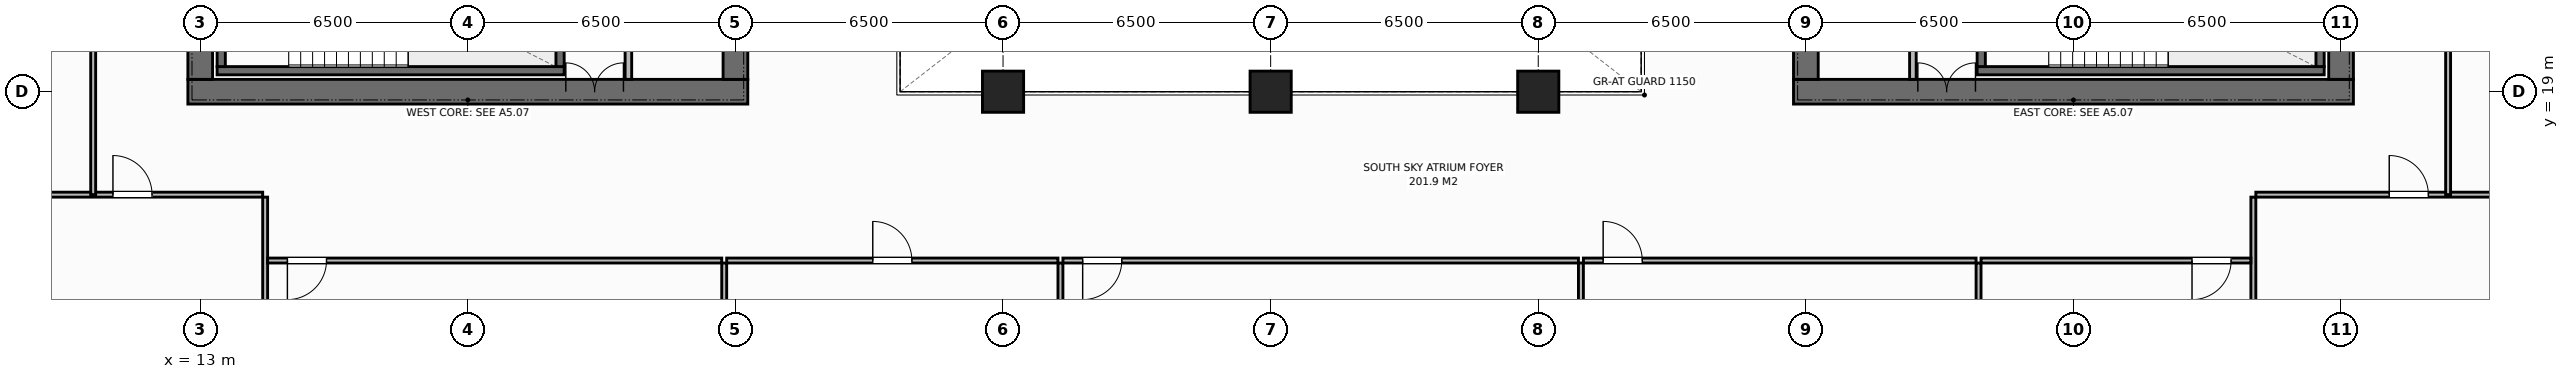
"""IFC4 building model, lengths in metres.
Left out: names, types, materials, properties, quantities, classifications, styles, units other than length and angle.
Written with IfcOpenShell. Run it as: python <this file> out.ifc"""

import sys

from ifc_helpers import new_model, si_unit, direction, frame, frame_2d, origin, origin_2d, place, context, subcontext, project, spatial, rectangle, extrude, element, fill, save


model = new_model("IFC4")
c1 = context("Model", 3, precision=1e-05, world=origin(), true_north=direction((0.0, 1.0)))
c2 = subcontext(c1, "Body", "Model", "MODEL_VIEW")
j1 = project(units=[si_unit("LENGTHUNIT", "METRE"), si_unit("PLANEANGLEUNIT", "RADIAN")], contexts=[c1])
p1 = place(None, origin())
s1 = spatial("IfcSite", under=j1, at=p1, CompositionType="ELEMENT")
p2 = place(p1, origin())
s2 = spatial("IfcBuilding", under=s1, at=p2, CompositionType="ELEMENT")
p3 = place(p2, frame((0.0, 0.0, 189.8)))
s3 = spatial("IfcBuildingStorey", under=s2, at=p3, CompositionType="ELEMENT", Elevation=189.8)
p4 = place(p3, frame((12.7, 19.0, 0.0), z_axis=(0.0, 0.0, 1.0), x_axis=(1.0, 0.0, 0.0)))
e1 = element("IfcWall", 1, at=p4, inside=s3, PredefinedType="SHEAR", context=c2, shape_type="SweptSolid", body=[
    extrude(rectangle(XDim=13.6, YDim=0.6, at=frame_2d((6.8, 0.0))), origin(), (0.0, 0.0, 1.0), 3.8),
])
p5 = place(p4, frame((9.18, 0.0, 0.0)))
e2 = element("IfcOpeningElement", 2, at=p5, cuts=e1, PredefinedType="OPENING", context=c2, shape_type="SweptSolid", body=[
    extrude(rectangle(XDim=1.4, YDim=2.2, at=frame_2d((0.7, 1.1))), frame((0.0, 0.31, 0.0), z_axis=(0.0, -1.0, 0.0), x_axis=(1.0, 0.0, 0.0)), (0.0, 0.0, 1.0), 0.62),
])
p6 = place(p3, frame((13.0, 19.3, 0.0), z_axis=(0.0, 0.0, 1.0), x_axis=(0.0, 1.0, 0.0)))
e3 = element("IfcWall", 3, at=p6, inside=s3, PredefinedType="SHEAR", context=c2, shape_type="SweptSolid", body=[
    extrude(rectangle(XDim=13.4, YDim=0.6, at=frame_2d((6.7, 0.0))), origin(), (0.0, 0.0, 1.0), 3.8),
])
p7 = place(p6, frame((4.75, 0.0, 0.0)))
e4 = element("IfcOpeningElement", 4, at=p7, cuts=e3, PredefinedType="OPENING", context=c2, shape_type="SweptSolid", body=[
    extrude(rectangle(XDim=1.4, YDim=2.2, at=frame_2d((0.7, 1.1))), frame((0.0, 0.31, 0.0), z_axis=(0.0, -1.0, 0.0), x_axis=(1.0, 0.0, 0.0)), (0.0, 0.0, 1.0), 0.62),
])
p8 = place(p3, frame((26.0, 19.3, 0.0), z_axis=(0.0, 0.0, 1.0), x_axis=(0.0, 1.0, 0.0)))
e5 = element("IfcWall", 5, at=p8, inside=s3, PredefinedType="SHEAR", context=c2, shape_type="SweptSolid", body=[
    extrude(rectangle(XDim=13.4, YDim=0.6, at=frame_2d((6.7, 0.0))), origin(), (0.0, 0.0, 1.0), 3.8),
])
p9 = place(p3, frame((51.7, 19.0, 0.0), z_axis=(0.0, 0.0, 1.0), x_axis=(1.0, 0.0, 0.0)))
e6 = element("IfcWall", 6, at=p9, inside=s3, PredefinedType="SHEAR", context=c2, shape_type="SweptSolid", body=[
    extrude(rectangle(XDim=13.6, YDim=0.6, at=frame_2d((6.8, 0.0))), origin(), (0.0, 0.0, 1.0), 3.8),
])
p10 = place(p9, frame((3.02, 0.0, 0.0)))
e7 = element("IfcOpeningElement", 7, at=p10, cuts=e6, PredefinedType="OPENING", context=c2, shape_type="SweptSolid", body=[
    extrude(rectangle(XDim=1.4, YDim=2.2, at=frame_2d((0.7, 1.1))), frame((0.0, 0.31, 0.0), z_axis=(0.0, -1.0, 0.0), x_axis=(1.0, 0.0, 0.0)), (0.0, 0.0, 1.0), 0.62),
])
p11 = place(p3, frame((52.0, 19.3, 0.0), z_axis=(0.0, 0.0, 1.0), x_axis=(0.0, 1.0, 0.0)))
e8 = element("IfcWall", 8, at=p11, inside=s3, PredefinedType="SHEAR", context=c2, shape_type="SweptSolid", body=[
    extrude(rectangle(XDim=13.4, YDim=0.6, at=frame_2d((6.7, 0.0))), origin(), (0.0, 0.0, 1.0), 3.8),
])
p12 = place(p3, frame((65.0, 19.3, 0.0), z_axis=(0.0, 0.0, 1.0), x_axis=(0.0, 1.0, 0.0)))
e9 = element("IfcWall", 9, at=p12, inside=s3, PredefinedType="SHEAR", context=c2, shape_type="SweptSolid", body=[
    extrude(rectangle(XDim=13.4, YDim=0.6, at=frame_2d((6.7, 0.0))), origin(), (0.0, 0.0, 1.0), 3.8),
])
p13 = place(p12, frame((8.15, 0.0, 0.0)))
e10 = element("IfcOpeningElement", 10, at=p13, cuts=e9, PredefinedType="OPENING", context=c2, shape_type="SweptSolid", body=[
    extrude(rectangle(XDim=1.3, YDim=2.2, at=frame_2d((0.65, 1.1))), frame((0.0, 0.31, 0.0), z_axis=(0.0, -1.0, 0.0), x_axis=(1.0, 0.0, 0.0)), (0.0, 0.0, 1.0), 0.62),
])
p14 = place(p3, frame((13.41, 19.51, 0.0), z_axis=(0.0, 0.0, 1.0), x_axis=(1.0, 0.0, 0.0)))
e11 = element("IfcWall", 11, at=p14, inside=s3, PredefinedType="SHEAR", context=c2, shape_type="SweptSolid", body=[
    extrude(rectangle(XDim=8.43, YDim=0.2, at=frame_2d((4.215, 0.0))), origin(), (0.0, 0.0, 1.0), 3.8),
])
for number, where, z_axis, x_axis in (
    (12, (13.51, 19.61, 0.0), (0.0, 0.0, 1.0), (0.0, 1.0, 0.0)),
    (13, (21.74, 19.61, 0.0), (0.0, 0.0, 1.0), (0.0, 1.0, 0.0)),
):
    element("IfcWall", number, at=place(p3, frame(where, z_axis=z_axis, x_axis=x_axis)), inside=s3, PredefinedType="SHEAR", context=c2, shape_type="SweptSolid", body=[
        extrude(rectangle(XDim=3.28, YDim=0.2, at=frame_2d((1.64, 0.0))), origin(), (0.0, 0.0, 1.0), 3.8),
    ])
p15 = place(p3, frame((56.16, 19.51, 0.0), z_axis=(0.0, 0.0, 1.0), x_axis=(1.0, 0.0, 0.0)))
e14 = element("IfcWall", 14, at=p15, inside=s3, PredefinedType="SHEAR", context=c2, shape_type="SweptSolid", body=[
    extrude(rectangle(XDim=8.43, YDim=0.2, at=frame_2d((4.215, 0.0))), origin(), (0.0, 0.0, 1.0), 3.8),
])
for number, where, z_axis, x_axis in (
    (15, (56.26, 19.61, 0.0), (0.0, 0.0, 1.0), (0.0, 1.0, 0.0)),
    (16, (64.49, 19.61, 0.0), (0.0, 0.0, 1.0), (0.0, 1.0, 0.0)),
):
    element("IfcWall", number, at=place(p3, frame(where, z_axis=z_axis, x_axis=x_axis)), inside=s3, PredefinedType="SHEAR", context=c2, shape_type="SweptSolid", body=[
        extrude(rectangle(XDim=3.28, YDim=0.2, at=frame_2d((1.64, 0.0))), origin(), (0.0, 0.0, 1.0), 3.8),
    ])
for number, where, z_axis, x_axis in (
    (17, (32.5, 19.0, 0.0), (0.0, 0.0, 1.0), (1.0, 0.0, 0.0)),
    (18, (39.0, 19.0, 0.0), (0.0, 0.0, 1.0), (1.0, 0.0, 0.0)),
    (19, (45.5, 19.0, 0.0), (0.0, 0.0, 1.0), (1.0, 0.0, 0.0)),
):
    element("IfcColumn", number, at=place(p3, frame(where, z_axis=z_axis, x_axis=x_axis)), inside=s3, PredefinedType="COLUMN", context=c2, shape_type="SweptSolid", body=[
        extrude(rectangle(XDim=1.0, YDim=1.0, at=origin_2d()), origin(), (0.0, 0.0, 1.0), 3.8),
    ])
p16 = place(p3, frame((23.4, 19.3, 0.0), z_axis=(0.0, 0.0, 1.0), x_axis=(0.0, 1.0, 0.0)))
e20 = element("IfcWall", 20, at=p16, inside=s3, PredefinedType="STANDARD", context=c2, shape_type="SweptSolid", body=[
    extrude(rectangle(XDim=13.4, YDim=0.16, at=frame_2d((6.7, 0.0))), origin(), (0.0, 0.0, 1.0), 3.572),
])
p17 = place(p16, frame((2.2, 0.0, 0.0)))
e21 = element("IfcOpeningElement", 21, at=p17, cuts=e20, PredefinedType="OPENING", context=c2, shape_type="SweptSolid", body=[
    extrude(rectangle(XDim=0.95, YDim=2.15, at=frame_2d((0.475, 1.075))), frame((0.0, 0.09, 0.0), z_axis=(0.0, -1.0, 0.0), x_axis=(1.0, 0.0, 0.0)), (0.0, 0.0, 1.0), 0.18),
])
p18 = place(p16, frame((6.3, 0.0, 0.0)))
e22 = element("IfcOpeningElement", 22, at=p18, cuts=e20, PredefinedType="OPENING", context=c2, shape_type="SweptSolid", body=[
    extrude(rectangle(XDim=0.95, YDim=2.15, at=frame_2d((0.475, 1.075))), frame((0.0, 0.09, 0.0), z_axis=(0.0, -1.0, 0.0), x_axis=(1.0, 0.0, 0.0)), (0.0, 0.0, 1.0), 0.18),
])
p19 = place(p16, frame((9.3, 0.0, 0.0)))
e23 = element("IfcOpeningElement", 23, at=p19, cuts=e20, PredefinedType="OPENING", context=c2, shape_type="SweptSolid", body=[
    extrude(rectangle(XDim=1.1, YDim=2.2, at=frame_2d((0.55, 1.1))), frame((0.0, 0.09, 0.0), z_axis=(0.0, -1.0, 0.0), x_axis=(1.0, 0.0, 0.0)), (0.0, 0.0, 1.0), 0.18),
])
p20 = place(p16, frame((11.5, 0.0, 0.0)))
e24 = element("IfcOpeningElement", 24, at=p20, cuts=e20, PredefinedType="OPENING", context=c2, shape_type="SweptSolid", body=[
    extrude(rectangle(XDim=1.1, YDim=2.2, at=frame_2d((0.55, 1.1))), frame((0.0, 0.09, 0.0), z_axis=(0.0, -1.0, 0.0), x_axis=(1.0, 0.0, 0.0)), (0.0, 0.0, 1.0), 0.18),
])
p21 = place(p3, frame((54.6, 19.3, 0.0), z_axis=(0.0, 0.0, 1.0), x_axis=(0.0, 1.0, 0.0)))
e25 = element("IfcWall", 25, at=p21, inside=s3, PredefinedType="STANDARD", context=c2, shape_type="SweptSolid", body=[
    extrude(rectangle(XDim=13.4, YDim=0.16, at=frame_2d((6.7, 0.0))), origin(), (0.0, 0.0, 1.0), 3.572),
])
p22 = place(p21, frame((2.1, 0.0, 0.0)))
e26 = element("IfcOpeningElement", 26, at=p22, cuts=e25, PredefinedType="OPENING", context=c2, shape_type="SweptSolid", body=[
    extrude(rectangle(XDim=0.95, YDim=2.15, at=frame_2d((0.475, 1.075))), frame((0.0, 0.09, 0.0), z_axis=(0.0, -1.0, 0.0), x_axis=(1.0, 0.0, 0.0)), (0.0, 0.0, 1.0), 0.18),
])
p23 = place(p21, frame((6.2, 0.0, 0.0)))
e27 = element("IfcOpeningElement", 27, at=p23, cuts=e25, PredefinedType="OPENING", context=c2, shape_type="SweptSolid", body=[
    extrude(rectangle(XDim=0.95, YDim=2.15, at=frame_2d((0.475, 1.075))), frame((0.0, 0.09, 0.0), z_axis=(0.0, -1.0, 0.0), x_axis=(1.0, 0.0, 0.0)), (0.0, 0.0, 1.0), 0.18),
])
p24 = place(p21, frame((9.3, 0.0, 0.0)))
e28 = element("IfcOpeningElement", 28, at=p24, cuts=e25, PredefinedType="OPENING", context=c2, shape_type="SweptSolid", body=[
    extrude(rectangle(XDim=1.1, YDim=2.2, at=frame_2d((0.55, 1.1))), frame((0.0, 0.09, 0.0), z_axis=(0.0, -1.0, 0.0), x_axis=(1.0, 0.0, 0.0)), (0.0, 0.0, 1.0), 0.18),
])
p25 = place(p21, frame((11.5, 0.0, 0.0)))
e29 = element("IfcOpeningElement", 29, at=p25, cuts=e25, PredefinedType="OPENING", context=c2, shape_type="SweptSolid", body=[
    extrude(rectangle(XDim=1.1, YDim=2.2, at=frame_2d((0.55, 1.1))), frame((0.0, 0.09, 0.0), z_axis=(0.0, -1.0, 0.0), x_axis=(1.0, 0.0, 0.0)), (0.0, 0.0, 1.0), 0.18),
])
p26 = place(p3, frame((14.577, 3.42, 0.0), z_axis=(0.0, 0.0, 1.0), x_axis=(0.0, 1.0, 0.0)))
e30 = element("IfcWall", 30, at=p26, inside=s3, PredefinedType="PARTITIONING", context=c2, shape_type="SweptSolid", body=[
    extrude(rectangle(XDim=13.02, YDim=0.12, at=frame_2d((6.51, 0.0))), origin(), (0.0, 0.0, 1.0), 3.572),
])
p27 = place(p3, frame((3.98, 16.5, 0.0), z_axis=(0.0, 0.0, 1.0), x_axis=(1.0, 0.0, 0.0)))
e31 = element("IfcWall", 31, at=p27, inside=s3, PredefinedType="PARTITIONING", context=c2, shape_type="SweptSolid", body=[
    extrude(rectangle(XDim=10.537, YDim=0.12, at=frame_2d((5.269, 0.0))), origin(), (0.0, 0.0, 1.0), 3.572),
])
p28 = place(p27, frame((6.9, 0.0, 0.0)))
e32 = element("IfcOpeningElement", 32, at=p28, cuts=e31, PredefinedType="OPENING", context=c2, shape_type="SweptSolid", body=[
    extrude(rectangle(XDim=0.95, YDim=2.15, at=frame_2d((0.475, 1.075))), frame((0.0, 0.07, 0.0), z_axis=(0.0, -1.0, 0.0), x_axis=(1.0, 0.0, 0.0)), (0.0, 0.0, 1.0), 0.14),
])
p29 = place(p3, frame((25.727, 3.42, 0.0), z_axis=(0.0, 0.0, 1.0), x_axis=(0.0, 1.0, 0.0)))
e33 = element("IfcWall", 33, at=p29, inside=s3, PredefinedType="PARTITIONING", context=c2, shape_type="SweptSolid", body=[
    extrude(rectangle(XDim=11.42, YDim=0.12, at=frame_2d((5.71, 0.0))), origin(), (0.0, 0.0, 1.0), 3.572),
])
p30 = place(p3, frame((14.637, 14.9, 0.0), z_axis=(0.0, 0.0, 1.0), x_axis=(1.0, 0.0, 0.0)))
e34 = element("IfcWall", 34, at=p30, inside=s3, PredefinedType="PARTITIONING", context=c2, shape_type="SweptSolid", body=[
    extrude(rectangle(XDim=11.03, YDim=0.12, at=frame_2d((5.515, 0.0))), origin(), (0.0, 0.0, 1.0), 3.572),
])
p31 = place(p30, frame((0.48, 0.0, 0.0)))
e35 = element("IfcOpeningElement", 35, at=p31, cuts=e34, PredefinedType="OPENING", context=c2, shape_type="SweptSolid", body=[
    extrude(rectangle(XDim=0.95, YDim=2.15, at=frame_2d((0.475, 1.075))), frame((0.0, 0.07, 0.0), z_axis=(0.0, -1.0, 0.0), x_axis=(1.0, 0.0, 0.0)), (0.0, 0.0, 1.0), 0.14),
])
p32 = place(p3, frame((33.894, 3.42, 0.0), z_axis=(0.0, 0.0, 1.0), x_axis=(0.0, 1.0, 0.0)))
e36 = element("IfcWall", 36, at=p32, inside=s3, PredefinedType="PARTITIONING", context=c2, shape_type="SweptSolid", body=[
    extrude(rectangle(XDim=11.42, YDim=0.12, at=frame_2d((5.71, 0.0))), origin(), (0.0, 0.0, 1.0), 3.572),
])
p33 = place(p3, frame((25.787, 14.9, 0.0), z_axis=(0.0, 0.0, 1.0), x_axis=(1.0, 0.0, 0.0)))
e37 = element("IfcWall", 37, at=p33, inside=s3, PredefinedType="PARTITIONING", context=c2, shape_type="SweptSolid", body=[
    extrude(rectangle(XDim=8.047, YDim=0.12, at=frame_2d((4.023, 0.0))), origin(), (0.0, 0.0, 1.0), 3.572),
])
p34 = place(p33, frame((3.548, 0.0, 0.0)))
e38 = element("IfcOpeningElement", 38, at=p34, cuts=e37, PredefinedType="OPENING", context=c2, shape_type="SweptSolid", body=[
    extrude(rectangle(XDim=0.95, YDim=2.15, at=frame_2d((0.475, 1.075))), frame((0.0, 0.07, 0.0), z_axis=(0.0, -1.0, 0.0), x_axis=(1.0, 0.0, 0.0)), (0.0, 0.0, 1.0), 0.14),
])
p35 = place(p3, frame((46.536, 3.42, 0.0), z_axis=(0.0, 0.0, 1.0), x_axis=(0.0, 1.0, 0.0)))
e39 = element("IfcWall", 39, at=p35, inside=s3, PredefinedType="PARTITIONING", context=c2, shape_type="SweptSolid", body=[
    extrude(rectangle(XDim=11.42, YDim=0.12, at=frame_2d((5.71, 0.0))), origin(), (0.0, 0.0, 1.0), 3.572),
])
p36 = place(p3, frame((33.954, 14.9, 0.0), z_axis=(0.0, 0.0, 1.0), x_axis=(1.0, 0.0, 0.0)))
e40 = element("IfcWall", 40, at=p36, inside=s3, PredefinedType="PARTITIONING", context=c2, shape_type="SweptSolid", body=[
    extrude(rectangle(XDim=12.522, YDim=0.12, at=frame_2d((6.261, 0.0))), origin(), (0.0, 0.0, 1.0), 3.572),
])
p37 = place(p36, frame((0.48, 0.0, 0.0)))
e41 = element("IfcOpeningElement", 41, at=p37, cuts=e40, PredefinedType="OPENING", context=c2, shape_type="SweptSolid", body=[
    extrude(rectangle(XDim=0.95, YDim=2.15, at=frame_2d((0.475, 1.075))), frame((0.0, 0.07, 0.0), z_axis=(0.0, -1.0, 0.0), x_axis=(1.0, 0.0, 0.0)), (0.0, 0.0, 1.0), 0.14),
])
p38 = place(p3, frame((56.195, 3.42, 0.0), z_axis=(0.0, 0.0, 1.0), x_axis=(0.0, 1.0, 0.0)))
e42 = element("IfcWall", 42, at=p38, inside=s3, PredefinedType="PARTITIONING", context=c2, shape_type="SweptSolid", body=[
    extrude(rectangle(XDim=11.42, YDim=0.12, at=frame_2d((5.71, 0.0))), origin(), (0.0, 0.0, 1.0), 3.572),
])
p39 = place(p3, frame((46.596, 14.9, 0.0), z_axis=(0.0, 0.0, 1.0), x_axis=(1.0, 0.0, 0.0)))
e43 = element("IfcWall", 43, at=p39, inside=s3, PredefinedType="PARTITIONING", context=c2, shape_type="SweptSolid", body=[
    extrude(rectangle(XDim=9.539, YDim=0.12, at=frame_2d((4.769, 0.0))), origin(), (0.0, 0.0, 1.0), 3.572),
])
p40 = place(p39, frame((0.48, 0.0, 0.0)))
e44 = element("IfcOpeningElement", 44, at=p40, cuts=e43, PredefinedType="OPENING", context=c2, shape_type="SweptSolid", body=[
    extrude(rectangle(XDim=0.95, YDim=2.15, at=frame_2d((0.475, 1.075))), frame((0.0, 0.07, 0.0), z_axis=(0.0, -1.0, 0.0), x_axis=(1.0, 0.0, 0.0)), (0.0, 0.0, 1.0), 0.14),
])
p41 = place(p3, frame((62.87, 3.42, 0.0), z_axis=(0.0, 0.0, 1.0), x_axis=(0.0, 1.0, 0.0)))
e45 = element("IfcWall", 45, at=p41, inside=s3, PredefinedType="PARTITIONING", context=c2, shape_type="SweptSolid", body=[
    extrude(rectangle(XDim=13.02, YDim=0.12, at=frame_2d((6.51, 0.0))), origin(), (0.0, 0.0, 1.0), 3.572),
])
p42 = place(p3, frame((56.255, 14.9, 0.0), z_axis=(0.0, 0.0, 1.0), x_axis=(1.0, 0.0, 0.0)))
e46 = element("IfcWall", 46, at=p42, inside=s3, PredefinedType="PARTITIONING", context=c2, shape_type="SweptSolid", body=[
    extrude(rectangle(XDim=6.555, YDim=0.12, at=frame_2d((3.277, 0.0))), origin(), (0.0, 0.0, 1.0), 3.572),
])
p43 = place(p42, frame((5.125, 0.0, 0.0)))
e47 = element("IfcOpeningElement", 47, at=p43, cuts=e46, PredefinedType="OPENING", context=c2, shape_type="SweptSolid", body=[
    extrude(rectangle(XDim=0.95, YDim=2.15, at=frame_2d((0.475, 1.075))), frame((0.0, 0.07, 0.0), z_axis=(0.0, -1.0, 0.0), x_axis=(1.0, 0.0, 0.0)), (0.0, 0.0, 1.0), 0.14),
])
p44 = place(p3, frame((62.93, 16.5, 0.0), z_axis=(0.0, 0.0, 1.0), x_axis=(1.0, 0.0, 0.0)))
e48 = element("IfcWall", 48, at=p44, inside=s3, PredefinedType="PARTITIONING", context=c2, shape_type="SweptSolid", body=[
    extrude(rectangle(XDim=11.09, YDim=0.12, at=frame_2d((5.545, 0.0))), origin(), (0.0, 0.0, 1.0), 3.572),
])
p45 = place(p44, frame((3.24, 0.0, 0.0)))
e49 = element("IfcOpeningElement", 49, at=p45, cuts=e48, PredefinedType="OPENING", context=c2, shape_type="SweptSolid", body=[
    extrude(rectangle(XDim=0.95, YDim=2.15, at=frame_2d((0.475, 1.075))), frame((0.0, 0.07, 0.0), z_axis=(0.0, -1.0, 0.0), x_axis=(1.0, 0.0, 0.0)), (0.0, 0.0, 1.0), 0.14),
])
p46 = place(p3, frame((10.4, 16.5, 0.0), z_axis=(0.0, 0.0, 1.0), x_axis=(0.0, 1.0, 0.0)))
e50 = element("IfcWall", 50, at=p46, inside=s3, PredefinedType="PARTITIONING", context=c2, shape_type="SweptSolid", body=[
    extrude(rectangle(XDim=6.333, YDim=0.12, at=frame_2d((3.167, 0.0))), origin(), (0.0, 0.0, 1.0), 3.572),
])
p47 = place(p46, frame((3.742, 0.0, 0.0)))
e51 = element("IfcOpeningElement", 51, at=p47, cuts=e50, PredefinedType="OPENING", context=c2, shape_type="SweptSolid", body=[
    extrude(rectangle(XDim=0.95, YDim=2.15, at=frame_2d((0.475, 1.075))), frame((0.0, 0.07, 0.0), z_axis=(0.0, -1.0, 0.0), x_axis=(1.0, 0.0, 0.0)), (0.0, 0.0, 1.0), 0.14),
])
p48 = place(p3, frame((67.6, 16.5, 0.0), z_axis=(0.0, 0.0, 1.0), x_axis=(0.0, 1.0, 0.0)))
e52 = element("IfcWall", 52, at=p48, inside=s3, PredefinedType="PARTITIONING", context=c2, shape_type="SweptSolid", body=[
    extrude(rectangle(XDim=16.9, YDim=0.12, at=frame_2d((8.45, 0.0))), origin(), (0.0, 0.0, 1.0), 3.572),
])
p49 = place(p48, frame((9.025, 0.0, 0.0)))
e53 = element("IfcOpeningElement", 53, at=p49, cuts=e52, PredefinedType="OPENING", context=c2, shape_type="SweptSolid", body=[
    extrude(rectangle(XDim=0.95, YDim=2.15, at=frame_2d((0.475, 1.075))), frame((0.0, 0.07, 0.0), z_axis=(0.0, -1.0, 0.0), x_axis=(1.0, 0.0, 0.0)), (0.0, 0.0, 1.0), 0.14),
])
p50 = place(p5, origin())
e54 = element("IfcDoor", 54, at=p50, inside=s3, OperationType="DOUBLE_DOOR_SINGLE_SWING", PredefinedType="DOOR", context=c2, shape_type="SweptSolid", body=[
    extrude(rectangle(XDim=1.4, YDim=2.2, at=frame_2d((0.7, 1.1))), frame((0.0, 0.075, 0.0), z_axis=(0.0, -1.0, 0.0), x_axis=(1.0, 0.0, 0.0)), (0.0, 0.0, 1.0), 0.05),
])
fill(e2, e54)
p51 = place(p10, origin())
e55 = element("IfcDoor", 55, at=p51, inside=s3, OperationType="DOUBLE_DOOR_SINGLE_SWING", PredefinedType="DOOR", context=c2, shape_type="SweptSolid", body=[
    extrude(rectangle(XDim=1.4, YDim=2.2, at=frame_2d((0.7, 1.1))), frame((0.0, 0.075, 0.0), z_axis=(0.0, -1.0, 0.0), x_axis=(1.0, 0.0, 0.0)), (0.0, 0.0, 1.0), 0.05),
])
fill(e7, e55)
p52 = place(p28, origin())
e56 = element("IfcDoor", 56, at=p52, inside=s3, OperationType="SINGLE_SWING_LEFT", PredefinedType="DOOR", context=c2, shape_type="SweptSolid", body=[
    extrude(rectangle(XDim=0.95, YDim=2.15, at=frame_2d((0.475, 1.075))), frame((0.0, 0.025, 0.0), z_axis=(0.0, -1.0, 0.0), x_axis=(1.0, 0.0, 0.0)), (0.0, 0.0, 1.0), 0.05),
])
fill(e32, e56)
p53 = place(p31, origin())
e57 = element("IfcDoor", 57, at=p53, inside=s3, OperationType="SINGLE_SWING_RIGHT", PredefinedType="DOOR", context=c2, shape_type="SweptSolid", body=[
    extrude(rectangle(XDim=0.95, YDim=2.15, at=frame_2d((0.475, 1.075))), frame((0.0, 0.025, 0.0), z_axis=(0.0, -1.0, 0.0), x_axis=(1.0, 0.0, 0.0)), (0.0, 0.0, 1.0), 0.05),
])
fill(e35, e57)
p54 = place(p34, origin())
e58 = element("IfcDoor", 58, at=p54, inside=s3, OperationType="SINGLE_SWING_LEFT", PredefinedType="DOOR", context=c2, shape_type="SweptSolid", body=[
    extrude(rectangle(XDim=0.95, YDim=2.15, at=frame_2d((0.475, 1.075))), frame((0.0, 0.025, 0.0), z_axis=(0.0, -1.0, 0.0), x_axis=(1.0, 0.0, 0.0)), (0.0, 0.0, 1.0), 0.05),
])
fill(e38, e58)
p55 = place(p37, origin())
e59 = element("IfcDoor", 59, at=p55, inside=s3, OperationType="SINGLE_SWING_RIGHT", PredefinedType="DOOR", context=c2, shape_type="SweptSolid", body=[
    extrude(rectangle(XDim=0.95, YDim=2.15, at=frame_2d((0.475, 1.075))), frame((0.0, 0.025, 0.0), z_axis=(0.0, -1.0, 0.0), x_axis=(1.0, 0.0, 0.0)), (0.0, 0.0, 1.0), 0.05),
])
fill(e41, e59)
p56 = place(p40, origin())
e60 = element("IfcDoor", 60, at=p56, inside=s3, OperationType="SINGLE_SWING_LEFT", PredefinedType="DOOR", context=c2, shape_type="SweptSolid", body=[
    extrude(rectangle(XDim=0.95, YDim=2.15, at=frame_2d((0.475, 1.075))), frame((0.0, 0.025, 0.0), z_axis=(0.0, -1.0, 0.0), x_axis=(1.0, 0.0, 0.0)), (0.0, 0.0, 1.0), 0.05),
])
fill(e44, e60)
p57 = place(p43, origin())
e61 = element("IfcDoor", 61, at=p57, inside=s3, OperationType="SINGLE_SWING_RIGHT", PredefinedType="DOOR", context=c2, shape_type="SweptSolid", body=[
    extrude(rectangle(XDim=0.95, YDim=2.15, at=frame_2d((0.475, 1.075))), frame((0.0, 0.025, 0.0), z_axis=(0.0, -1.0, 0.0), x_axis=(1.0, 0.0, 0.0)), (0.0, 0.0, 1.0), 0.05),
])
fill(e47, e61)
p58 = place(p45, origin())
e62 = element("IfcDoor", 62, at=p58, inside=s3, OperationType="SINGLE_SWING_LEFT", PredefinedType="DOOR", context=c2, shape_type="SweptSolid", body=[
    extrude(rectangle(XDim=0.95, YDim=2.15, at=frame_2d((0.475, 1.075))), frame((0.0, 0.025, 0.0), z_axis=(0.0, -1.0, 0.0), x_axis=(1.0, 0.0, 0.0)), (0.0, 0.0, 1.0), 0.05),
])
fill(e49, e62)
save(model, sys.argv[1])
